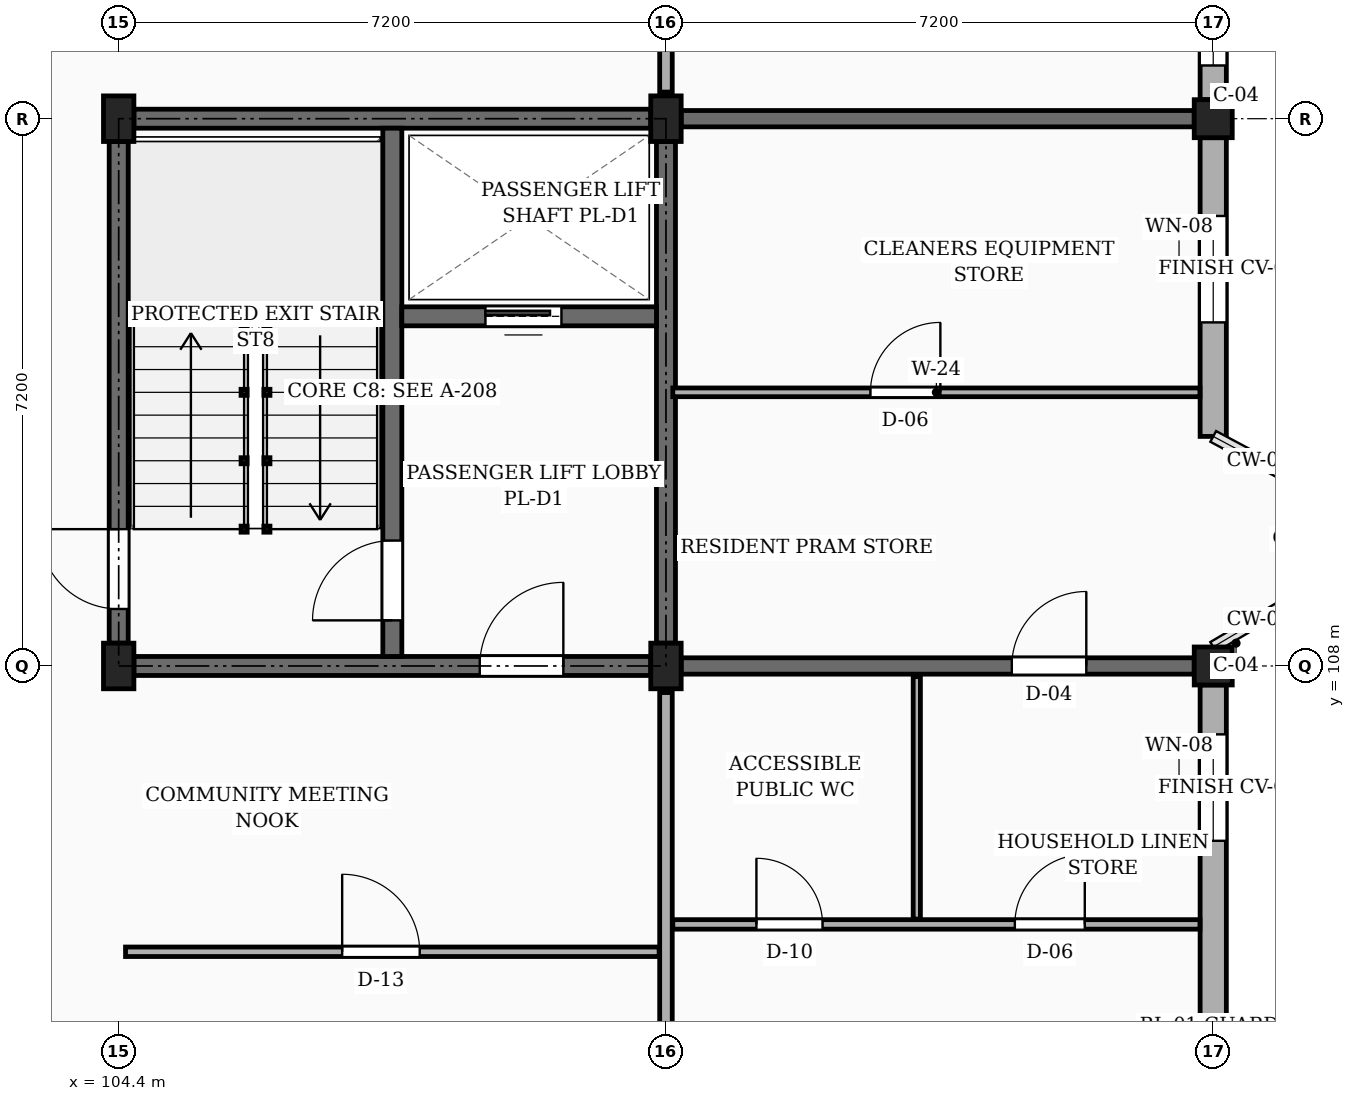
"""IFC4 building model, lengths in metres.
Left out: names, types, materials, properties, quantities, classifications, styles, units other than length and angle.
Written with IfcOpenShell. Run it as: python <this file> out.ifc"""

import sys

from ifc_helpers import new_model, si_unit, direction, frame, frame_2d, origin, origin_2d, place, context, subcontext, project, spatial, rectangle, extrude, element, fill, save


model = new_model("IFC4")
c1 = context("Model", 3, precision=1e-05, world=origin(), true_north=direction((0.0, 1.0)))
c2 = subcontext(c1, "Body", "Model", "MODEL_VIEW")
j1 = project(units=[si_unit("LENGTHUNIT", "METRE"), si_unit("PLANEANGLEUNIT", "RADIAN")], contexts=[c1])
p1 = place(None, origin())
s1 = spatial("IfcSite", under=j1, at=p1, CompositionType="ELEMENT")
p2 = place(p1, origin())
s2 = spatial("IfcBuilding", under=s1, at=p2, CompositionType="ELEMENT")
p3 = place(p2, frame((0.0, 0.0, 26.55)))
s3 = spatial("IfcBuildingStorey", under=s2, at=p3, CompositionType="ELEMENT", Elevation=26.55)
for number, where, z_axis, x_axis in (
    (1, (104.4, 108.0, 0.0), (0.0, 0.0, 1.0), (1.0, 0.0, 0.0)),
    (2, (104.4, 115.2, 0.0), (0.0, 0.0, 1.0), (1.0, 0.0, 0.0)),
    (3, (111.6, 108.0, 0.0), (0.0, 0.0, 1.0), (1.0, 0.0, 0.0)),
    (4, (111.6, 115.2, 0.0), (0.0, 0.0, 1.0), (1.0, 0.0, 0.0)),
):
    element("IfcColumn", number, at=place(p3, frame(where, z_axis=z_axis, x_axis=x_axis)), inside=s3, PredefinedType="COLUMN", context=c2, shape_type="SweptSolid", body=[
        extrude(rectangle(XDim=0.4, YDim=0.6, at=origin_2d()), origin(), (0.0, 0.0, 1.0), 3.15),
    ])
for number, where, z_axis, x_axis in (
    (5, (118.8, 108.0, 0.0), (0.0, 0.0, 1.0), (1.0, 0.0, 0.0)),
    (6, (118.8, 115.2, 0.0), (0.0, 0.0, 1.0), (1.0, 0.0, 0.0)),
):
    element("IfcColumn", number, at=place(p3, frame(where, z_axis=z_axis, x_axis=x_axis)), inside=s3, PredefinedType="COLUMN", context=c2, shape_type="SweptSolid", body=[
        extrude(rectangle(XDim=0.5, YDim=0.5, at=origin_2d()), origin(), (0.0, 0.0, 1.0), 3.15),
    ])
p4 = place(p3, frame((111.8, 108.0, 0.0), z_axis=(0.0, 0.0, 1.0), x_axis=(1.0, 0.0, 0.0)))
e7 = element("IfcWall", 7, at=p4, inside=s3, PredefinedType="SOLIDWALL", context=c2, shape_type="SweptSolid", body=[
    extrude(rectangle(XDim=6.75, YDim=0.215, at=frame_2d((3.375, 0.0))), origin(), (0.0, 0.0, 1.0), 2.19),
])
p5 = place(p4, frame((4.35, 0.0, 0.0)))
e8 = element("IfcOpeningElement", 8, at=p5, cuts=e7, PredefinedType="OPENING", context=c2, shape_type="SweptSolid", body=[
    extrude(rectangle(XDim=0.98, YDim=2.12, at=frame_2d((0.49, 1.06))), frame((0.0, 0.118, 0.0), z_axis=(0.0, -1.0, 0.0), x_axis=(1.0, 0.0, 0.0)), (0.0, 0.0, 1.0), 0.235),
])
p6 = place(p3, frame((111.8, 115.2, 0.0), z_axis=(0.0, 0.0, 1.0), x_axis=(1.0, 0.0, 0.0)))
e9 = element("IfcWall", 9, at=p6, inside=s3, PredefinedType="SOLIDWALL", context=c2, shape_type="SweptSolid", body=[
    extrude(rectangle(XDim=6.75, YDim=0.215, at=frame_2d((3.375, 0.0))), origin(), (0.0, 0.0, 1.0), 2.19),
])
p7 = place(p3, frame((118.8, 101.05, 0.0), z_axis=(0.0, 0.0, 1.0), x_axis=(0.0, 1.0, 0.0)))
e10 = element("IfcWall", 10, at=p7, inside=s3, PredefinedType="SOLIDWALL", context=c2, shape_type="SweptSolid", body=[
    extrude(rectangle(XDim=6.7, YDim=0.345, at=frame_2d((3.35, 0.0))), origin(), (0.0, 0.0, 1.0), 2.46),
])
p8 = place(p7, frame((0.45, 0.0, 0.78)))
e11 = element("IfcOpeningElement", 11, at=p8, cuts=e10, PredefinedType="OPENING", context=c2, shape_type="SweptSolid", body=[
    extrude(rectangle(XDim=1.24, YDim=1.15, at=frame_2d((0.62, 0.575))), frame((0.0, 0.183, 0.0), z_axis=(0.0, -1.0, 0.0), x_axis=(1.0, 0.0, 0.0)), (0.0, 0.0, 1.0), 0.365),
])
p9 = place(p7, frame((4.65, 0.0, 0.78)))
e12 = element("IfcOpeningElement", 12, at=p9, cuts=e10, PredefinedType="OPENING", context=c2, shape_type="SweptSolid", body=[
    extrude(rectangle(XDim=1.4, YDim=1.15, at=frame_2d((0.7, 0.575))), frame((0.0, 0.183, 0.0), z_axis=(0.0, -1.0, 0.0), x_axis=(1.0, 0.0, 0.0)), (0.0, 0.0, 1.0), 0.365),
])
p10 = place(p3, frame((118.8, 111.02, 0.0), z_axis=(0.0, 0.0, 1.0), x_axis=(0.0, 1.0, 0.0)))
e13 = element("IfcWall", 13, at=p10, inside=s3, PredefinedType="SOLIDWALL", context=c2, shape_type="SweptSolid", body=[
    extrude(rectangle(XDim=3.93, YDim=0.345, at=frame_2d((1.965, 0.0))), origin(), (0.0, 0.0, 1.0), 2.46),
])
p11 = place(p10, frame((1.5, 0.0, 0.78)))
e14 = element("IfcOpeningElement", 14, at=p11, cuts=e13, PredefinedType="OPENING", context=c2, shape_type="SweptSolid", body=[
    extrude(rectangle(XDim=1.4, YDim=1.15, at=frame_2d((0.7, 0.575))), frame((0.0, 0.183, 0.0), z_axis=(0.0, -1.0, 0.0), x_axis=(1.0, 0.0, 0.0)), (0.0, 0.0, 1.0), 0.365),
])
p12 = place(p3, frame((118.8, 115.45, 0.0), z_axis=(0.0, 0.0, 1.0), x_axis=(0.0, 1.0, 0.0)))
e15 = element("IfcWall", 15, at=p12, inside=s3, PredefinedType="SOLIDWALL", context=c2, shape_type="SweptSolid", body=[
    extrude(rectangle(XDim=6.7, YDim=0.345, at=frame_2d((3.35, 0.0))), origin(), (0.0, 0.0, 1.0), 2.46),
])
p13 = place(p12, frame((0.45, 0.0, 0.78)))
e16 = element("IfcOpeningElement", 16, at=p13, cuts=e15, PredefinedType="OPENING", context=c2, shape_type="SweptSolid", body=[
    extrude(rectangle(XDim=0.88, YDim=1.26, at=frame_2d((0.44, 0.63))), frame((0.0, 0.183, 0.0), z_axis=(0.0, -1.0, 0.0), x_axis=(1.0, 0.0, 0.0)), (0.0, 0.0, 1.0), 0.365),
])
p14 = place(p12, frame((4.65, 0.0, 0.78)))
e17 = element("IfcOpeningElement", 17, at=p14, cuts=e15, PredefinedType="OPENING", context=c2, shape_type="SweptSolid", body=[
    extrude(rectangle(XDim=1.04, YDim=1.26, at=frame_2d((0.52, 0.63))), frame((0.0, 0.183, 0.0), z_axis=(0.0, -1.0, 0.0), x_axis=(1.0, 0.0, 0.0)), (0.0, 0.0, 1.0), 0.365),
])
p15 = place(p3, frame((104.4, 108.3, 0.0), z_axis=(0.0, 0.0, 1.0), x_axis=(0.0, 1.0, 0.0)))
e18 = element("IfcWall", 18, at=p15, inside=s3, PredefinedType="SHEAR", context=c2, shape_type="SweptSolid", body=[
    extrude(rectangle(XDim=6.6, YDim=0.25, at=frame_2d((3.3, 0.0))), origin(), (0.0, 0.0, 1.0), 2.89),
])
p16 = place(p15, frame((0.45, 0.0, 0.0)))
e19 = element("IfcOpeningElement", 19, at=p16, cuts=e18, PredefinedType="OPENING", context=c2, shape_type="SweptSolid", body=[
    extrude(rectangle(XDim=1.05, YDim=2.15, at=frame_2d((0.525, 1.075))), frame((0.0, 0.135, 0.0), z_axis=(0.0, -1.0, 0.0), x_axis=(1.0, 0.0, 0.0)), (0.0, 0.0, 1.0), 0.27),
])
p17 = place(p3, frame((104.6, 115.2, 0.0), z_axis=(0.0, 0.0, 1.0), x_axis=(1.0, 0.0, 0.0)))
e20 = element("IfcWall", 20, at=p17, inside=s3, PredefinedType="SHEAR", context=c2, shape_type="SweptSolid", body=[
    extrude(rectangle(XDim=6.8, YDim=0.25, at=frame_2d((3.4, 0.0))), origin(), (0.0, 0.0, 1.0), 2.89),
])
p18 = place(p3, frame((111.6, 108.3, 0.0), z_axis=(0.0, 0.0, 1.0), x_axis=(0.0, 1.0, 0.0)))
e21 = element("IfcWall", 21, at=p18, inside=s3, PredefinedType="SHEAR", context=c2, shape_type="SweptSolid", body=[
    extrude(rectangle(XDim=6.6, YDim=0.25, at=frame_2d((3.3, 0.0))), origin(), (0.0, 0.0, 1.0), 2.89),
])
p19 = place(p3, frame((104.6, 108.0, 0.0), z_axis=(0.0, 0.0, 1.0), x_axis=(1.0, 0.0, 0.0)))
e22 = element("IfcWall", 22, at=p19, inside=s3, PredefinedType="SHEAR", context=c2, shape_type="SweptSolid", body=[
    extrude(rectangle(XDim=6.8, YDim=0.25, at=frame_2d((3.4, 0.0))), origin(), (0.0, 0.0, 1.0), 2.89),
])
p20 = place(p19, frame((4.55, 0.0, 0.0)))
e23 = element("IfcOpeningElement", 23, at=p20, cuts=e22, PredefinedType="OPENING", context=c2, shape_type="SweptSolid", body=[
    extrude(rectangle(XDim=1.1, YDim=2.15, at=frame_2d((0.55, 1.075))), frame((0.0, 0.135, 0.0), z_axis=(0.0, -1.0, 0.0), x_axis=(1.0, 0.0, 0.0)), (0.0, 0.0, 1.0), 0.27),
])
p21 = place(p3, frame((108.0, 108.125, 0.0), z_axis=(0.0, 0.0, 1.0), x_axis=(0.0, 1.0, 0.0)))
e24 = element("IfcWall", 24, at=p21, inside=s3, PredefinedType="SHEAR", context=c2, shape_type="SweptSolid", body=[
    extrude(rectangle(XDim=6.95, YDim=0.25, at=frame_2d((3.475, 0.0))), origin(), (0.0, 0.0, 1.0), 2.89),
])
p22 = place(p21, frame((0.475, 0.0, 0.0)))
e25 = element("IfcOpeningElement", 25, at=p22, cuts=e24, PredefinedType="OPENING", context=c2, shape_type="SweptSolid", body=[
    extrude(rectangle(XDim=1.05, YDim=2.15, at=frame_2d((0.525, 1.075))), frame((0.0, 0.135, 0.0), z_axis=(0.0, -1.0, 0.0), x_axis=(1.0, 0.0, 0.0)), (0.0, 0.0, 1.0), 0.27),
])
p23 = place(p3, frame((108.125, 112.6, 0.0), z_axis=(0.0, 0.0, 1.0), x_axis=(1.0, 0.0, 0.0)))
e26 = element("IfcWall", 26, at=p23, inside=s3, PredefinedType="SHEAR", context=c2, shape_type="SweptSolid", body=[
    extrude(rectangle(XDim=3.35, YDim=0.25, at=frame_2d((1.675, 0.0))), origin(), (0.0, 0.0, 1.0), 2.89),
])
p24 = place(p23, frame((1.1, 0.0, 0.0)))
e27 = element("IfcOpeningElement", 27, at=p24, cuts=e26, PredefinedType="OPENING", context=c2, shape_type="SweptSolid", body=[
    extrude(rectangle(XDim=1.0, YDim=2.2, at=frame_2d((0.5, 1.1))), frame((0.0, 0.135, 0.0), z_axis=(0.0, -1.0, 0.0), x_axis=(1.0, 0.0, 0.0)), (0.0, 0.0, 1.0), 0.27),
])
p25 = place(p3, frame((111.6, 101.15, 0.0), z_axis=(0.0, 0.0, 1.0), x_axis=(0.0, 1.0, 0.0)))
e28 = element("IfcWall", 28, at=p25, inside=s3, PredefinedType="PARTITIONING", context=c2, shape_type="SweptSolid", body=[
    extrude(rectangle(XDim=6.5, YDim=0.165, at=frame_2d((3.25, 0.0))), origin(), (0.0, 0.0, 1.0), 2.325),
])
p26 = place(p25, frame((1.1, 0.0, 0.0)))
e29 = element("IfcOpeningElement", 29, at=p26, cuts=e28, PredefinedType="OPENING", context=c2, shape_type="SweptSolid", body=[
    extrude(rectangle(XDim=1.0, YDim=2.15, at=frame_2d((0.5, 1.075))), frame((0.0, 0.093, 0.0), z_axis=(0.0, -1.0, 0.0), x_axis=(1.0, 0.0, 0.0)), (0.0, 0.0, 1.0), 0.185),
])
p27 = place(p3, frame((111.6, 115.55, 0.0), z_axis=(0.0, 0.0, 1.0), x_axis=(0.0, 1.0, 0.0)))
e30 = element("IfcWall", 30, at=p27, inside=s3, PredefinedType="PARTITIONING", context=c2, shape_type="SweptSolid", body=[
    extrude(rectangle(XDim=6.5, YDim=0.165, at=frame_2d((3.25, 0.0))), origin(), (0.0, 0.0, 1.0), 2.325),
])
p28 = place(p27, frame((1.1, 0.0, 0.0)))
e31 = element("IfcOpeningElement", 31, at=p28, cuts=e30, PredefinedType="OPENING", context=c2, shape_type="SweptSolid", body=[
    extrude(rectangle(XDim=0.94, YDim=2.12, at=frame_2d((0.47, 1.06))), frame((0.0, 0.093, 0.0), z_axis=(0.0, -1.0, 0.0), x_axis=(1.0, 0.0, 0.0)), (0.0, 0.0, 1.0), 0.185),
])
p29 = place(p3, frame((104.49, 104.24, 0.0), z_axis=(0.0, 0.0, 1.0), x_axis=(1.0, 0.0, 0.0)))
e32 = element("IfcWall", 32, at=p29, inside=s3, PredefinedType="PARTITIONING", context=c2, shape_type="SweptSolid", body=[
    extrude(rectangle(XDim=7.02, YDim=0.125, at=frame_2d((3.51, 0.0))), origin(), (0.0, 0.0, 1.0), 2.325),
])
p30 = place(p29, frame((2.85, 0.0, 0.0)))
e33 = element("IfcOpeningElement", 33, at=p30, cuts=e32, PredefinedType="OPENING", context=c2, shape_type="SweptSolid", body=[
    extrude(rectangle(XDim=1.02, YDim=2.15, at=frame_2d((0.51, 1.075))), frame((0.0, 0.073, 0.0), z_axis=(0.0, -1.0, 0.0), x_axis=(1.0, 0.0, 0.0)), (0.0, 0.0, 1.0), 0.145),
])
p31 = place(p3, frame((111.69, 104.6, 0.0), z_axis=(0.0, 0.0, 1.0), x_axis=(1.0, 0.0, 0.0)))
e34 = element("IfcWall", 34, at=p31, inside=s3, PredefinedType="PARTITIONING", context=c2, shape_type="SweptSolid", body=[
    extrude(rectangle(XDim=6.935, YDim=0.125, at=frame_2d((3.468, 0.0))), origin(), (0.0, 0.0, 1.0), 2.325),
])
p32 = place(p31, frame((1.1, 0.0, 0.0)))
e35 = element("IfcOpeningElement", 35, at=p32, cuts=e34, PredefinedType="OPENING", context=c2, shape_type="SweptSolid", body=[
    extrude(rectangle(XDim=0.87, YDim=2.05, at=frame_2d((0.435, 1.025))), frame((0.0, 0.073, 0.0), z_axis=(0.0, -1.0, 0.0), x_axis=(1.0, 0.0, 0.0)), (0.0, 0.0, 1.0), 0.145),
])
p33 = place(p31, frame((4.5, 0.0, 0.0)))
e36 = element("IfcOpeningElement", 36, at=p33, cuts=e34, PredefinedType="OPENING", context=c2, shape_type="SweptSolid", body=[
    extrude(rectangle(XDim=0.92, YDim=2.1, at=frame_2d((0.46, 1.05))), frame((0.0, 0.073, 0.0), z_axis=(0.0, -1.0, 0.0), x_axis=(1.0, 0.0, 0.0)), (0.0, 0.0, 1.0), 0.145),
])
p34 = place(p3, frame((114.9, 104.67, 0.0), z_axis=(0.0, 0.0, 1.0), x_axis=(0.0, 1.0, 0.0)))
e37 = element("IfcWall", 37, at=p34, inside=s3, PredefinedType="PARTITIONING", context=c2, shape_type="SweptSolid", body=[
    extrude(rectangle(XDim=3.19, YDim=0.095, at=frame_2d((1.595, 0.0))), origin(), (0.0, 0.0, 1.0), 2.325),
])
p35 = place(p3, frame((111.69, 111.6, 0.0), z_axis=(0.0, 0.0, 1.0), x_axis=(1.0, 0.0, 0.0)))
e38 = element("IfcWall", 38, at=p35, inside=s3, PredefinedType="PARTITIONING", context=c2, shape_type="SweptSolid", body=[
    extrude(rectangle(XDim=6.935, YDim=0.115, at=frame_2d((3.468, 0.0))), origin(), (0.0, 0.0, 1.0), 2.325),
])
p36 = place(p35, frame((2.6, 0.0, 0.0)))
e39 = element("IfcOpeningElement", 39, at=p36, cuts=e38, PredefinedType="OPENING", context=c2, shape_type="SweptSolid", body=[
    extrude(rectangle(XDim=0.92, YDim=2.1, at=frame_2d((0.46, 1.05))), frame((0.0, 0.067, 0.0), z_axis=(0.0, -1.0, 0.0), x_axis=(1.0, 0.0, 0.0)), (0.0, 0.0, 1.0), 0.135),
])
p37 = place(p9, origin())
e40 = element("IfcWindow", 40, at=p37, inside=s3, PartitioningType="SINGLE_PANEL", PredefinedType="WINDOW", context=c2, shape_type="SweptSolid", body=[
    extrude(rectangle(XDim=1.4, YDim=1.15, at=frame_2d((0.7, 0.575))), frame((0.0, 0.03, 0.0), z_axis=(0.0, -1.0, 0.0), x_axis=(1.0, 0.0, 0.0)), (0.0, 0.0, 1.0), 0.06),
])
fill(e12, e40)
p38 = place(p11, origin())
e41 = element("IfcWindow", 41, at=p38, inside=s3, PartitioningType="SINGLE_PANEL", PredefinedType="WINDOW", context=c2, shape_type="SweptSolid", body=[
    extrude(rectangle(XDim=1.4, YDim=1.15, at=frame_2d((0.7, 0.575))), frame((0.0, 0.03, 0.0), z_axis=(0.0, -1.0, 0.0), x_axis=(1.0, 0.0, 0.0)), (0.0, 0.0, 1.0), 0.06),
])
fill(e14, e41)
p39 = place(p13, origin())
e42 = element("IfcWindow", 42, at=p39, inside=s3, PartitioningType="SINGLE_PANEL", PredefinedType="WINDOW", context=c2, shape_type="SweptSolid", body=[
    extrude(rectangle(XDim=0.88, YDim=1.26, at=frame_2d((0.44, 0.63))), frame((0.0, 0.03, 0.0), z_axis=(0.0, -1.0, 0.0), x_axis=(1.0, 0.0, 0.0)), (0.0, 0.0, 1.0), 0.06),
])
fill(e16, e42)
p40 = place(p16, origin())
e43 = element("IfcDoor", 43, at=p40, inside=s3, OperationType="SINGLE_SWING_RIGHT", PredefinedType="DOOR", context=c2, shape_type="SweptSolid", body=[
    extrude(rectangle(XDim=1.05, YDim=2.15, at=frame_2d((0.525, 1.075))), frame((0.0, 0.025, 0.0), z_axis=(0.0, -1.0, 0.0), x_axis=(1.0, 0.0, 0.0)), (0.0, 0.0, 1.0), 0.05),
])
fill(e19, e43)
p41 = place(p20, frame((1.1, 0.0, 0.0), z_axis=(0.0, 0.0, 1.0), x_axis=(-1.0, 0.0, 0.0)))
e44 = element("IfcDoor", 44, at=p41, inside=s3, OperationType="SINGLE_SWING_RIGHT", PredefinedType="DOOR", context=c2, shape_type="SweptSolid", body=[
    extrude(rectangle(XDim=1.1, YDim=2.15, at=frame_2d((0.55, 1.075))), frame((0.0, 0.025, 0.0), z_axis=(0.0, -1.0, 0.0), x_axis=(1.0, 0.0, 0.0)), (0.0, 0.0, 1.0), 0.05),
])
fill(e23, e44)
p42 = place(p22, origin())
e45 = element("IfcDoor", 45, at=p42, inside=s3, OperationType="SINGLE_SWING_LEFT", PredefinedType="DOOR", context=c2, shape_type="SweptSolid", body=[
    extrude(rectangle(XDim=1.05, YDim=2.15, at=frame_2d((0.525, 1.075))), frame((0.0, 0.025, 0.0), z_axis=(0.0, -1.0, 0.0), x_axis=(1.0, 0.0, 0.0)), (0.0, 0.0, 1.0), 0.05),
])
fill(e25, e45)
p43 = place(p24, origin())
e46 = element("IfcDoor", 46, at=p43, inside=s3, OperationType="SLIDING_TO_LEFT", PredefinedType="DOOR", context=c2, shape_type="SweptSolid", body=[
    extrude(rectangle(XDim=1.0, YDim=2.2, at=frame_2d((0.5, 1.1))), frame((0.0, 0.025, 0.0), z_axis=(0.0, -1.0, 0.0), x_axis=(1.0, 0.0, 0.0)), (0.0, 0.0, 1.0), 0.05),
])
fill(e27, e46)
p44 = place(p30, origin())
e47 = element("IfcDoor", 47, at=p44, inside=s3, OperationType="SINGLE_SWING_LEFT", PredefinedType="DOOR", context=c2, shape_type="SweptSolid", body=[
    extrude(rectangle(XDim=1.02, YDim=2.15, at=frame_2d((0.51, 1.075))), frame((0.0, 0.025, 0.0), z_axis=(0.0, -1.0, 0.0), x_axis=(1.0, 0.0, 0.0)), (0.0, 0.0, 1.0), 0.05),
])
fill(e33, e47)
p45 = place(p32, origin())
e48 = element("IfcDoor", 48, at=p45, inside=s3, OperationType="SINGLE_SWING_LEFT", PredefinedType="DOOR", context=c2, shape_type="SweptSolid", body=[
    extrude(rectangle(XDim=0.87, YDim=2.05, at=frame_2d((0.435, 1.025))), frame((0.0, 0.025, 0.0), z_axis=(0.0, -1.0, 0.0), x_axis=(1.0, 0.0, 0.0)), (0.0, 0.0, 1.0), 0.05),
])
fill(e35, e48)
p46 = place(p33, origin())
e49 = element("IfcDoor", 49, at=p46, inside=s3, OperationType="SINGLE_SWING_RIGHT", PredefinedType="DOOR", context=c2, shape_type="SweptSolid", body=[
    extrude(rectangle(XDim=0.92, YDim=2.1, at=frame_2d((0.46, 1.05))), frame((0.0, 0.025, 0.0), z_axis=(0.0, -1.0, 0.0), x_axis=(1.0, 0.0, 0.0)), (0.0, 0.0, 1.0), 0.05),
])
fill(e36, e49)
p47 = place(p36, origin())
e50 = element("IfcDoor", 50, at=p47, inside=s3, OperationType="SINGLE_SWING_RIGHT", PredefinedType="DOOR", context=c2, shape_type="SweptSolid", body=[
    extrude(rectangle(XDim=0.92, YDim=2.1, at=frame_2d((0.46, 1.05))), frame((0.0, 0.025, 0.0), z_axis=(0.0, -1.0, 0.0), x_axis=(1.0, 0.0, 0.0)), (0.0, 0.0, 1.0), 0.05),
])
fill(e39, e50)
p48 = place(p5, origin())
e51 = element("IfcDoor", 51, at=p48, inside=s3, OperationType="SINGLE_SWING_RIGHT", PredefinedType="DOOR", context=c2, shape_type="SweptSolid", body=[
    extrude(rectangle(XDim=0.98, YDim=2.12, at=frame_2d((0.49, 1.06))), frame((0.0, 0.025, 0.0), z_axis=(0.0, -1.0, 0.0), x_axis=(1.0, 0.0, 0.0)), (0.0, 0.0, 1.0), 0.05),
])
fill(e8, e51)
save(model, sys.argv[1])
